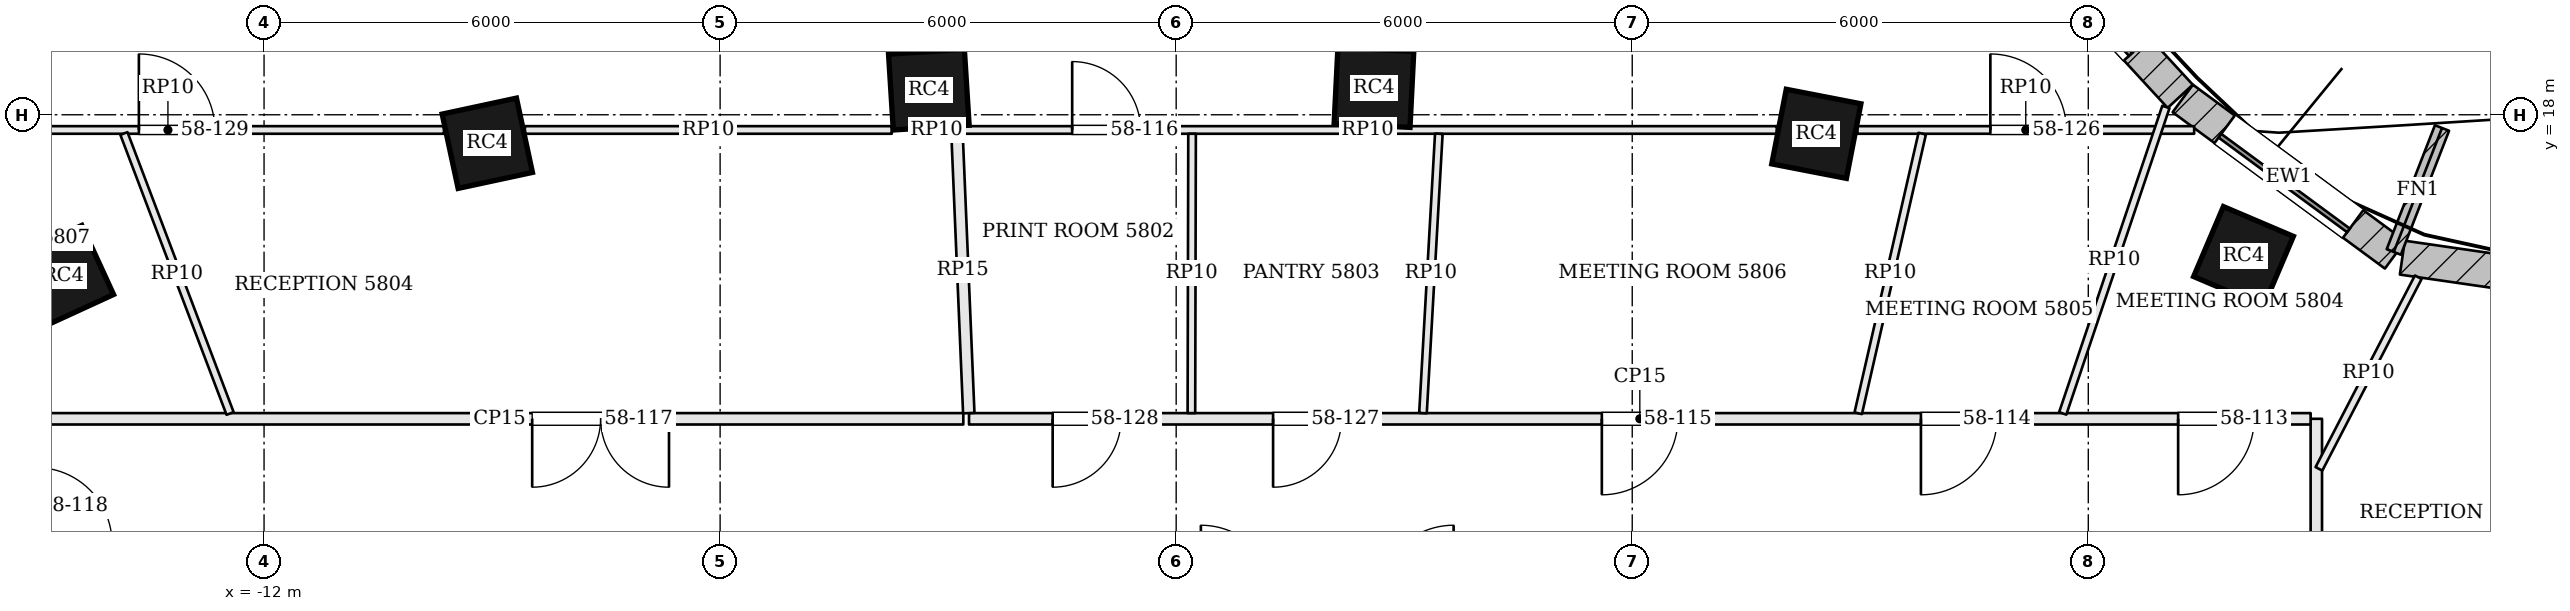
"""IFC4 building model, lengths in metres.
Left out: names, types, materials, properties, quantities, classifications, styles, units other than length and angle.
Written with IfcOpenShell. Run it as: python <this file> out.ifc"""

import sys

from ifc_helpers import new_model, si_unit, direction, frame, frame_2d, origin, origin_2d, place, context, subcontext, project, spatial, rectangle, extrude, element, fill, save


model = new_model("IFC4")
c1 = context("Model", 3, precision=1e-05, world=origin(), true_north=direction((0.0, 1.0)))
c2 = subcontext(c1, "Body", "Model", "MODEL_VIEW")
j1 = project(units=[si_unit("LENGTHUNIT", "METRE"), si_unit("PLANEANGLEUNIT", "RADIAN")], contexts=[c1])
p1 = place(None, origin())
s1 = spatial("IfcSite", under=j1, at=p1, CompositionType="ELEMENT")
p2 = place(p1, origin())
s2 = spatial("IfcBuilding", under=s1, at=p2, CompositionType="ELEMENT")
p3 = place(p2, frame((0.0, 0.0, 237.0)))
s3 = spatial("IfcBuildingStorey", under=s2, at=p3, CompositionType="ELEMENT", Elevation=237.0)
for number, where, z_axis, x_axis in (
    (1, (14.042, 16.136, 0.0), (0.0, 0.0, 1.0), (-0.92, 0.392, 0.0)),
    (2, (8.422, 17.749, 0.0), (0.0, 0.0, 1.0), (-0.982, 0.191, 0.0)),
    (3, (2.602, 18.358, 0.0), (0.0, 0.0, 1.0), (-0.999, 0.05, 0.0)),
    (4, (-3.254, 18.33, 0.0), (0.0, 0.0, 1.0), (-0.998, -0.063, 0.0)),
    (5, (-9.063, 17.625, 0.0), (0.0, 0.0, 1.0), (-0.978, -0.21, 0.0)),
    (6, (-14.643, 15.881, 0.0), (0.0, 0.0, 1.0), (-0.909, -0.417, 0.0)),
):
    element("IfcColumn", number, at=place(p3, frame(where, z_axis=z_axis, x_axis=x_axis)), inside=s3, PredefinedType="COLUMN", context=c2, shape_type="SweptSolid", body=[
        extrude(rectangle(XDim=1.0, YDim=1.0, at=origin_2d()), origin(), (0.0, 0.0, 1.0), 3.9),
    ])
p4 = place(p3, frame((21.825, 15.297, 0.0), z_axis=(0.0, 0.0, 1.0), x_axis=(-0.98971474215, 0.143054986527, 0.0)))
e7 = element("IfcWall", 7, at=p4, inside=s3, PredefinedType="SOLIDWALL", context=c2, shape_type="SweptSolid", body=[
    extrude(rectangle(XDim=5.753, YDim=0.45, at=frame_2d((2.876, 0.0))), origin(), (0.0, 0.0, 1.0), 3.7),
])
p5 = place(p4, frame((1.826, 0.0, 0.9)))
e8 = element("IfcOpeningElement", 8, at=p5, cuts=e7, PredefinedType="OPENING", context=c2, shape_type="SweptSolid", body=[
    extrude(rectangle(XDim=2.1, YDim=2.3, at=frame_2d((1.05, 1.15))), frame((0.0, 0.235, 0.0), z_axis=(0.0, -1.0, 0.0), x_axis=(1.0, 0.0, 0.0)), (0.0, 0.0, 1.0), 0.47),
])
p6 = place(p3, frame((16.036, 16.158, 0.0), z_axis=(0.0, 0.0, 1.0), x_axis=(-0.805181432967, 0.593028549064, 0.0)))
e9 = element("IfcWall", 9, at=p6, inside=s3, PredefinedType="SOLIDWALL", context=c2, shape_type="SweptSolid", body=[
    extrude(rectangle(XDim=3.469, YDim=0.45, at=frame_2d((1.734, 0.0))), origin(), (0.0, 0.0, 1.0), 3.7),
])
p7 = place(p6, frame((0.684, 0.0, 0.9)))
e10 = element("IfcOpeningElement", 10, at=p7, cuts=e9, PredefinedType="OPENING", context=c2, shape_type="SweptSolid", body=[
    extrude(rectangle(XDim=2.1, YDim=2.3, at=frame_2d((1.05, 1.15))), frame((0.0, 0.235, 0.0), z_axis=(0.0, -1.0, 0.0), x_axis=(1.0, 0.0, 0.0)), (0.0, 0.0, 1.0), 0.47),
])
p8 = place(p3, frame((13.209, 18.243, 0.0), z_axis=(0.0, 0.0, 1.0), x_axis=(-0.677612152497, 0.735419452278, 0.0)))
e11 = element("IfcWall", 11, at=p8, inside=s3, PredefinedType="SOLIDWALL", context=c2, shape_type="SweptSolid", body=[
    extrude(rectangle(XDim=3.797, YDim=0.45, at=frame_2d((1.898, 0.0))), origin(), (0.0, 0.0, 1.0), 3.7),
])
p9 = place(p8, frame((0.848, 0.0, 0.9)))
e12 = element("IfcOpeningElement", 12, at=p9, cuts=e11, PredefinedType="OPENING", context=c2, shape_type="SweptSolid", body=[
    extrude(rectangle(XDim=2.1, YDim=2.3, at=frame_2d((1.05, 1.15))), frame((0.0, 0.235, 0.0), z_axis=(0.0, -1.0, 0.0), x_axis=(1.0, 0.0, 0.0)), (0.0, 0.0, 1.0), 0.47),
])
p10 = place(p3, frame((-14.926, 20.641, 0.0), z_axis=(0.0, 0.0, 1.0), x_axis=(-0.631548074669, -0.775336720001, 0.0)))
e13 = element("IfcWall", 13, at=p10, inside=s3, PredefinedType="SOLIDWALL", context=c2, shape_type="SweptSolid", body=[
    extrude(rectangle(XDim=3.308, YDim=0.45, at=frame_2d((1.654, 0.0))), origin(), (0.0, 0.0, 1.0), 3.7),
])
p11 = place(p10, frame((0.604, 0.0, 0.9)))
e14 = element("IfcOpeningElement", 14, at=p11, cuts=e13, PredefinedType="OPENING", context=c2, shape_type="SweptSolid", body=[
    extrude(rectangle(XDim=2.1, YDim=2.3, at=frame_2d((1.05, 1.15))), frame((0.0, 0.235, 0.0), z_axis=(0.0, -1.0, 0.0), x_axis=(1.0, 0.0, 0.0)), (0.0, 0.0, 1.0), 0.47),
])
p12 = place(p3, frame((16.019, 16.195, 0.0), z_axis=(0.0, 0.0, 1.0), x_axis=(0.362641522028, 0.931928713208, 0.0)))
e15 = element("IfcWall", 15, at=p12, inside=s3, PredefinedType="SOLIDWALL", context=c2, shape_type="SweptSolid", body=[
    extrude(rectangle(XDim=1.75, YDim=0.2, at=frame_2d((0.875, 0.0))), origin(), (0.0, 0.0, 1.0), 3.7),
])
p13 = place(p3, frame((21.493, 15.114, 0.0), z_axis=(0.0, 0.0, 1.0), x_axis=(-0.659778549164, -0.751460089467, 0.0)))
e16 = element("IfcWall", 16, at=p13, inside=s3, PredefinedType="PARTITIONING", context=c2, shape_type="SweptSolid", body=[
    extrude(rectangle(XDim=7.877, YDim=0.15, at=frame_2d((3.938, 0.0))), origin(), (0.0, 0.0, 1.0), 3.184),
])
p14 = place(p3, frame((15.0, 10.196, 0.0), z_axis=(0.0, 0.0, 1.0), x_axis=(0.0, 1.0, 0.0)))
e17 = element("IfcWall", 17, at=p14, inside=s3, PredefinedType="PARTITIONING", context=c2, shape_type="SweptSolid", body=[
    extrude(rectangle(XDim=3.804, YDim=0.15, at=frame_2d((1.902, 0.0))), origin(), (0.0, 0.0, 1.0), 3.084),
])
p15 = place(p14, frame((0.45, 0.0, 0.0)))
e18 = element("IfcOpeningElement", 18, at=p15, cuts=e17, PredefinedType="OPENING", context=c2, shape_type="SweptSolid", body=[
    extrude(rectangle(XDim=1.8, YDim=2.1, at=frame_2d((0.9, 1.05))), frame((0.0, 0.085, 0.0), z_axis=(0.0, -1.0, 0.0), x_axis=(1.0, 0.0, 0.0)), (0.0, 0.0, 1.0), 0.17),
])
p16 = place(p3, frame((14.925, 14.0, 0.0), z_axis=(0.0, 0.0, 1.0), x_axis=(-1.0, 0.0, 0.0)))
e19 = element("IfcWall", 19, at=p16, inside=s3, PredefinedType="PARTITIONING", context=c2, shape_type="SweptSolid", body=[
    extrude(rectangle(XDim=17.65, YDim=0.15, at=frame_2d((8.825, 0.0))), origin(), (0.0, 0.0, 1.0), 3.084),
])
p17 = place(p16, frame((0.743, 0.0, 0.0)))
e20 = element("IfcOpeningElement", 20, at=p17, cuts=e19, PredefinedType="OPENING", context=c2, shape_type="SweptSolid", body=[
    extrude(rectangle(XDim=1.0, YDim=2.4, at=frame_2d((0.5, 1.2))), frame((0.0, 0.085, 0.0), z_axis=(0.0, -1.0, 0.0), x_axis=(1.0, 0.0, 0.0)), (0.0, 0.0, 1.0), 0.17),
])
p18 = place(p16, frame((4.127, 0.0, 0.0)))
e21 = element("IfcOpeningElement", 21, at=p18, cuts=e19, PredefinedType="OPENING", context=c2, shape_type="SweptSolid", body=[
    extrude(rectangle(XDim=1.0, YDim=2.4, at=frame_2d((0.5, 1.2))), frame((0.0, 0.085, 0.0), z_axis=(0.0, -1.0, 0.0), x_axis=(1.0, 0.0, 0.0)), (0.0, 0.0, 1.0), 0.17),
])
p19 = place(p16, frame((8.325, 0.0, 0.0)))
e22 = element("IfcOpeningElement", 22, at=p19, cuts=e19, PredefinedType="OPENING", context=c2, shape_type="SweptSolid", body=[
    extrude(rectangle(XDim=1.0, YDim=2.4, at=frame_2d((0.5, 1.2))), frame((0.0, 0.085, 0.0), z_axis=(0.0, -1.0, 0.0), x_axis=(1.0, 0.0, 0.0)), (0.0, 0.0, 1.0), 0.17),
])
p20 = place(p16, frame((12.75, 0.0, 0.0)))
e23 = element("IfcOpeningElement", 23, at=p20, cuts=e19, PredefinedType="OPENING", context=c2, shape_type="SweptSolid", body=[
    extrude(rectangle(XDim=0.9, YDim=2.1, at=frame_2d((0.45, 1.05))), frame((0.0, 0.085, 0.0), z_axis=(0.0, -1.0, 0.0), x_axis=(1.0, 0.0, 0.0)), (0.0, 0.0, 1.0), 0.17),
])
p21 = place(p16, frame((15.65, 0.0, 0.0)))
e24 = element("IfcOpeningElement", 24, at=p21, cuts=e19, PredefinedType="OPENING", context=c2, shape_type="SweptSolid", body=[
    extrude(rectangle(XDim=0.9, YDim=2.1, at=frame_2d((0.45, 1.05))), frame((0.0, 0.085, 0.0), z_axis=(0.0, -1.0, 0.0), x_axis=(1.0, 0.0, 0.0)), (0.0, 0.0, 1.0), 0.17),
])
p22 = place(p3, frame((-2.887, 17.832, 0.0), z_axis=(0.0, 0.0, 1.0), x_axis=(0.042070718288, -0.999114635396, 0.0)))
e25 = element("IfcWall", 25, at=p22, inside=s3, PredefinedType="PARTITIONING", context=c2, shape_type="SweptSolid", body=[
    extrude(rectangle(XDim=3.76, YDim=0.15, at=frame_2d((1.88, 0.0))), origin(), (0.0, 0.0, 1.0), 3.184),
])
p23 = place(p3, frame((-2.8, 14.0, 0.0), z_axis=(0.0, 0.0, 1.0), x_axis=(-1.0, 0.0, 0.0)))
e26 = element("IfcWall", 26, at=p23, inside=s3, PredefinedType="PARTITIONING", context=c2, shape_type="SweptSolid", body=[
    extrude(rectangle(XDim=12.2, YDim=0.15, at=frame_2d((6.1, 0.0))), origin(), (0.0, 0.0, 1.0), 3.084),
])
p24 = place(p23, frame((3.872, 0.0, 0.0)))
e27 = element("IfcOpeningElement", 27, at=p24, cuts=e26, PredefinedType="OPENING", context=c2, shape_type="SweptSolid", body=[
    extrude(rectangle(XDim=1.8, YDim=2.1, at=frame_2d((0.9, 1.05))), frame((0.0, 0.085, 0.0), z_axis=(0.0, -1.0, 0.0), x_axis=(1.0, 0.0, 0.0)), (0.0, 0.0, 1.0), 0.17),
])
p25 = place(p3, frame((-2.865, 17.8, 0.0), z_axis=(0.0, 0.0, 1.0), x_axis=(1.0, 0.0, 0.0)))
e28 = element("IfcWall", 28, at=p25, inside=s3, PredefinedType="PARTITIONING", context=c2, shape_type="SweptSolid", body=[
    extrude(rectangle(XDim=10.767, YDim=0.1, at=frame_2d((5.384, 0.0))), origin(), (0.0, 0.0, 1.0), 3.084),
])
p26 = place(p25, frame((1.497, 0.0, 0.0)))
e29 = element("IfcOpeningElement", 29, at=p26, cuts=e28, PredefinedType="OPENING", context=c2, shape_type="SweptSolid", body=[
    extrude(rectangle(XDim=0.9, YDim=2.1, at=frame_2d((0.45, 1.05))), frame((0.0, 0.06, 0.0), z_axis=(0.0, -1.0, 0.0), x_axis=(1.0, 0.0, 0.0)), (0.0, 0.0, 1.0), 0.12),
])
p27 = place(p3, frame((8.962, 17.8, 0.0), z_axis=(0.0, 0.0, 1.0), x_axis=(1.0, 0.0, 0.0)))
e30 = element("IfcWall", 30, at=p27, inside=s3, PredefinedType="PARTITIONING", context=c2, shape_type="SweptSolid", body=[
    extrude(rectangle(XDim=4.431, YDim=0.1, at=frame_2d((2.216, 0.0))), origin(), (0.0, 0.0, 1.0), 3.084),
])
p28 = place(p27, frame((1.75, 0.0, 0.0)))
e31 = element("IfcOpeningElement", 31, at=p28, cuts=e30, PredefinedType="OPENING", context=c2, shape_type="SweptSolid", body=[
    extrude(rectangle(XDim=1.0, YDim=2.4, at=frame_2d((0.5, 1.2))), frame((0.0, 0.06, 0.0), z_axis=(0.0, -1.0, 0.0), x_axis=(1.0, 0.0, 0.0)), (0.0, 0.0, 1.0), 0.12),
])
p29 = place(p3, frame((15.034, 13.341, 0.0), z_axis=(0.0, 0.0, 1.0), x_axis=(0.460131451108, 0.887850802614, 0.0)))
e32 = element("IfcWall", 32, at=p29, inside=s3, PredefinedType="PARTITIONING", context=c2, shape_type="SweptSolid", body=[
    extrude(rectangle(XDim=2.84, YDim=0.1, at=frame_2d((1.42, 0.0))), origin(), (0.0, 0.0, 1.0), 3.084),
])
p30 = place(p3, frame((11.664, 14.071, 0.0), z_axis=(0.0, 0.0, 1.0), x_axis=(0.319050122348, 0.947737843198, 0.0)))
e33 = element("IfcWall", 33, at=p30, inside=s3, PredefinedType="PARTITIONING", context=c2, shape_type="SweptSolid", body=[
    extrude(rectangle(XDim=4.254, YDim=0.1, at=frame_2d((2.127, 0.0))), origin(), (0.0, 0.0, 1.0), 3.084),
])
p31 = place(p3, frame((8.973, 14.073, 0.0), z_axis=(0.0, 0.0, 1.0), x_axis=(0.22309183241, 0.97479743245, 0.0)))
e34 = element("IfcWall", 34, at=p31, inside=s3, PredefinedType="PARTITIONING", context=c2, shape_type="SweptSolid", body=[
    extrude(rectangle(XDim=3.773, YDim=0.1, at=frame_2d((1.887, 0.0))), origin(), (0.0, 0.0, 1.0), 3.084),
])
p32 = place(p3, frame((3.247, 14.075, 0.0), z_axis=(0.0, 0.0, 1.0), x_axis=(0.056641796207, 0.99839456475, 0.0)))
e35 = element("IfcWall", 35, at=p32, inside=s3, PredefinedType="PARTITIONING", context=c2, shape_type="SweptSolid", body=[
    extrude(rectangle(XDim=3.681, YDim=0.1, at=frame_2d((1.84, 0.0))), origin(), (0.0, 0.0, 1.0), 3.084),
])
p33 = place(p3, frame((0.2, 14.075, 0.0), z_axis=(0.0, 0.0, 1.0), x_axis=(0.002325111632, 0.999997296924, 0.0)))
e36 = element("IfcWall", 36, at=p33, inside=s3, PredefinedType="PARTITIONING", context=c2, shape_type="SweptSolid", body=[
    extrude(rectangle(XDim=3.675, YDim=0.1, at=frame_2d((1.837, 0.0))), origin(), (0.0, 0.0, 1.0), 3.084),
])
p34 = place(p3, frame((-16.897, 17.8, 0.0), z_axis=(0.0, 0.0, 1.0), x_axis=(1.0, 0.0, 0.0)))
e37 = element("IfcWall", 37, at=p34, inside=s3, PredefinedType="PARTITIONING", context=c2, shape_type="SweptSolid", body=[
    extrude(rectangle(XDim=7.264, YDim=0.1, at=frame_2d((3.632, 0.0))), origin(), (0.0, 0.0, 1.0), 3.084),
])
p35 = place(p34, frame((3.25, 0.0, 0.0)))
e38 = element("IfcOpeningElement", 38, at=p35, cuts=e37, PredefinedType="OPENING", context=c2, shape_type="SweptSolid", body=[
    extrude(rectangle(XDim=1.0, YDim=2.1, at=frame_2d((0.5, 1.05))), frame((0.0, 0.06, 0.0), z_axis=(0.0, -1.0, 0.0), x_axis=(1.0, 0.0, 0.0)), (0.0, 0.0, 1.0), 0.12),
])
p36 = place(p3, frame((-8.569, 17.8, 0.0), z_axis=(0.0, 0.0, 1.0), x_axis=(1.0, 0.0, 0.0)))
e39 = element("IfcWall", 39, at=p36, inside=s3, PredefinedType="PARTITIONING", context=c2, shape_type="SweptSolid", body=[
    extrude(rectangle(XDim=4.827, YDim=0.1, at=frame_2d((2.414, 0.0))), origin(), (0.0, 0.0, 1.0), 3.084),
])
p37 = place(p3, frame((-3.397, 17.8, 0.0), z_axis=(0.0, 0.0, 1.0), x_axis=(1.0, 0.0, 0.0)))
e40 = element("IfcWall", 40, at=p37, inside=s3, PredefinedType="PARTITIONING", context=c2, shape_type="SweptSolid", body=[
    extrude(rectangle(XDim=0.491, YDim=0.1, at=frame_2d((0.246, 0.0))), origin(), (0.0, 0.0, 1.0), 3.084),
])
p38 = place(p3, frame((-12.447, 14.07, 0.0), z_axis=(0.0, 0.0, 1.0), x_axis=(-0.35453091347, 0.935044293814, 0.0)))
e41 = element("IfcWall", 41, at=p38, inside=s3, PredefinedType="PARTITIONING", context=c2, shape_type="SweptSolid", body=[
    extrude(rectangle(XDim=3.939, YDim=0.1, at=frame_2d((1.969, 0.0))), origin(), (0.0, 0.0, 1.0), 3.084),
])
p39 = place(p7, origin())
e42 = element("IfcWindow", 42, at=p39, inside=s3, PartitioningType="SINGLE_PANEL", PredefinedType="WINDOW", context=c2, shape_type="SweptSolid", body=[
    extrude(rectangle(XDim=2.1, YDim=2.3, at=frame_2d((1.05, 1.15))), frame((0.0, 0.135, 0.0), z_axis=(0.0, -1.0, 0.0), x_axis=(1.0, 0.0, 0.0)), (0.0, 0.0, 1.0), 0.06),
])
fill(e10, e42)
p40 = place(p9, origin())
e43 = element("IfcWindow", 43, at=p40, inside=s3, PartitioningType="SINGLE_PANEL", PredefinedType="WINDOW", context=c2, shape_type="SweptSolid", body=[
    extrude(rectangle(XDim=2.1, YDim=2.3, at=frame_2d((1.05, 1.15))), frame((0.0, 0.135, 0.0), z_axis=(0.0, -1.0, 0.0), x_axis=(1.0, 0.0, 0.0)), (0.0, 0.0, 1.0), 0.06),
])
fill(e12, e43)
p41 = place(p17, origin())
e44 = element("IfcDoor", 44, at=p41, inside=s3, OperationType="SINGLE_SWING_RIGHT", PredefinedType="DOOR", context=c2, shape_type="SweptSolid", body=[
    extrude(rectangle(XDim=1.0, YDim=2.4, at=frame_2d((0.5, 1.2))), frame((0.0, 0.025, 0.0), z_axis=(0.0, -1.0, 0.0), x_axis=(1.0, 0.0, 0.0)), (0.0, 0.0, 1.0), 0.05),
])
fill(e20, e44)
p42 = place(p18, origin())
e45 = element("IfcDoor", 45, at=p42, inside=s3, OperationType="SINGLE_SWING_RIGHT", PredefinedType="DOOR", context=c2, shape_type="SweptSolid", body=[
    extrude(rectangle(XDim=1.0, YDim=2.4, at=frame_2d((0.5, 1.2))), frame((0.0, 0.025, 0.0), z_axis=(0.0, -1.0, 0.0), x_axis=(1.0, 0.0, 0.0)), (0.0, 0.0, 1.0), 0.05),
])
fill(e21, e45)
p43 = place(p19, origin())
e46 = element("IfcDoor", 46, at=p43, inside=s3, OperationType="SINGLE_SWING_RIGHT", PredefinedType="DOOR", context=c2, shape_type="SweptSolid", body=[
    extrude(rectangle(XDim=1.0, YDim=2.4, at=frame_2d((0.5, 1.2))), frame((0.0, 0.025, 0.0), z_axis=(0.0, -1.0, 0.0), x_axis=(1.0, 0.0, 0.0)), (0.0, 0.0, 1.0), 0.05),
])
fill(e22, e46)
p44 = place(p26, origin())
e47 = element("IfcDoor", 47, at=p44, inside=s3, OperationType="SINGLE_SWING_LEFT", PredefinedType="DOOR", context=c2, shape_type="SweptSolid", body=[
    extrude(rectangle(XDim=0.9, YDim=2.1, at=frame_2d((0.45, 1.05))), frame((0.0, 0.025, 0.0), z_axis=(0.0, -1.0, 0.0), x_axis=(1.0, 0.0, 0.0)), (0.0, 0.0, 1.0), 0.05),
])
fill(e29, e47)
p45 = place(p24, origin())
e48 = element("IfcDoor", 48, at=p45, inside=s3, OperationType="DOUBLE_DOOR_SINGLE_SWING", PredefinedType="DOOR", context=c2, shape_type="SweptSolid", body=[
    extrude(rectangle(XDim=1.8, YDim=2.1, at=frame_2d((0.9, 1.05))), frame((0.0, 0.025, 0.0), z_axis=(0.0, -1.0, 0.0), x_axis=(1.0, 0.0, 0.0)), (0.0, 0.0, 1.0), 0.05),
])
fill(e27, e48)
p46 = place(p28, origin())
e49 = element("IfcDoor", 49, at=p46, inside=s3, OperationType="SINGLE_SWING_LEFT", PredefinedType="DOOR", context=c2, shape_type="SweptSolid", body=[
    extrude(rectangle(XDim=1.0, YDim=2.4, at=frame_2d((0.5, 1.2))), frame((0.0, 0.025, 0.0), z_axis=(0.0, -1.0, 0.0), x_axis=(1.0, 0.0, 0.0)), (0.0, 0.0, 1.0), 0.05),
])
fill(e31, e49)
p47 = place(p20, origin())
e50 = element("IfcDoor", 50, at=p47, inside=s3, OperationType="SINGLE_SWING_RIGHT", PredefinedType="DOOR", context=c2, shape_type="SweptSolid", body=[
    extrude(rectangle(XDim=0.9, YDim=2.1, at=frame_2d((0.45, 1.05))), frame((0.0, 0.025, 0.0), z_axis=(0.0, -1.0, 0.0), x_axis=(1.0, 0.0, 0.0)), (0.0, 0.0, 1.0), 0.05),
])
fill(e23, e50)
p48 = place(p21, origin())
e51 = element("IfcDoor", 51, at=p48, inside=s3, OperationType="SINGLE_SWING_RIGHT", PredefinedType="DOOR", context=c2, shape_type="SweptSolid", body=[
    extrude(rectangle(XDim=0.9, YDim=2.1, at=frame_2d((0.45, 1.05))), frame((0.0, 0.025, 0.0), z_axis=(0.0, -1.0, 0.0), x_axis=(1.0, 0.0, 0.0)), (0.0, 0.0, 1.0), 0.05),
])
fill(e24, e51)
p49 = place(p35, origin())
e52 = element("IfcDoor", 52, at=p49, inside=s3, OperationType="SINGLE_SWING_LEFT", PredefinedType="DOOR", context=c2, shape_type="SweptSolid", body=[
    extrude(rectangle(XDim=1.0, YDim=2.1, at=frame_2d((0.5, 1.05))), frame((0.0, 0.025, 0.0), z_axis=(0.0, -1.0, 0.0), x_axis=(1.0, 0.0, 0.0)), (0.0, 0.0, 1.0), 0.05),
])
fill(e38, e52)
save(model, sys.argv[1])
